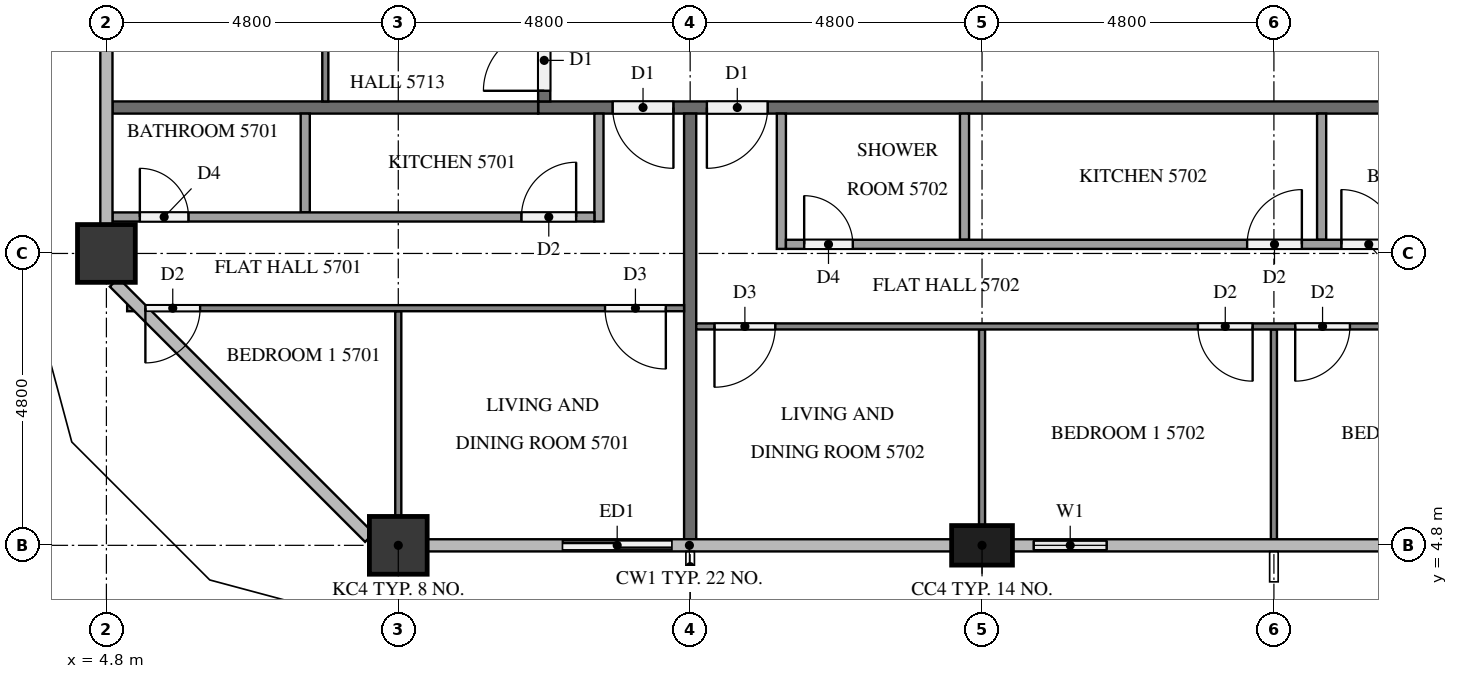
"""IFC4 building model, lengths in metres.
Left out: names, types, materials, properties, quantities, classifications, styles, units other than length and angle.
Written with IfcOpenShell. Run it as: python <this file> out.ifc"""

import sys

from ifc_helpers import new_model, si_unit, direction, frame, frame_2d, origin, origin_2d, place, context, subcontext, project, spatial, rectangle, extrude, element, fill, save


model = new_model("IFC4")
c1 = context("Model", 3, precision=1e-05, world=origin(), true_north=direction((0.0, 1.0)))
c2 = subcontext(c1, "Body", "Model", "MODEL_VIEW")
j1 = project(units=[si_unit("LENGTHUNIT", "METRE"), si_unit("PLANEANGLEUNIT", "RADIAN")], contexts=[c1])
p1 = place(None, origin())
s1 = spatial("IfcSite", under=j1, at=p1, CompositionType="ELEMENT")
p2 = place(p1, origin())
s2 = spatial("IfcBuilding", under=s1, at=p2, CompositionType="ELEMENT")
p3 = place(p2, frame((0.0, 0.0, 219.3)))
s3 = spatial("IfcBuildingStorey", under=s2, at=p3, CompositionType="ELEMENT", Elevation=219.3)
p4 = place(p3, frame((9.6, 4.8, 0.0), z_axis=(0.0, 0.0, 1.0), x_axis=(1.0, 0.0, 0.0)))
e1 = element("IfcColumn", 1, at=p4, inside=s3, PredefinedType="COLUMN", context=c2, shape_type="SweptSolid", body=[
    extrude(rectangle(XDim=0.95, YDim=0.95, at=origin_2d()), origin(), (0.0, 0.0, 1.0), 3.2),
])
p5 = place(p3, frame((19.2, 4.8, 0.0), z_axis=(0.0, 0.0, 1.0), x_axis=(1.0, 0.0, 0.0)))
e2 = element("IfcColumn", 2, at=p5, inside=s3, PredefinedType="COLUMN", context=c2, shape_type="SweptSolid", body=[
    extrude(rectangle(XDim=1.0, YDim=0.65, at=origin_2d()), origin(), (0.0, 0.0, 1.0), 3.2),
])
p6 = place(p3, frame((4.8, 9.6, 0.0), z_axis=(0.0, 0.0, 1.0), x_axis=(1.0, 0.0, 0.0)))
e3 = element("IfcColumn", 3, at=p6, inside=s3, PredefinedType="COLUMN", context=c2, shape_type="SweptSolid", body=[
    extrude(rectangle(XDim=0.95, YDim=0.95, at=origin_2d()), origin(), (0.0, 0.0, 1.0), 3.2),
])
p7 = place(p3, frame((12.0, 4.8, 0.0), z_axis=(0.0, 0.0, 1.0), x_axis=(1.0, 0.0, 0.0)))
e4 = element("IfcWall", 4, at=p7, inside=s3, PredefinedType="SOLIDWALL", context=c2, shape_type="SweptSolid", body=[
    extrude(rectangle(XDim=2.4, YDim=0.15, at=frame_2d((1.2, 0.0))), origin(), (0.0, 0.0, 1.0), 3.2),
])
p8 = place(p7, frame((0.3, 0.0, 0.0)))
e5 = element("IfcOpeningElement", 5, at=p8, cuts=e4, PredefinedType="OPENING", context=c2, shape_type="SweptSolid", body=[
    extrude(rectangle(XDim=1.8, YDim=2.4, at=frame_2d((0.9, 1.2))), frame((0.0, 0.085, 0.0), z_axis=(0.0, -1.0, 0.0), x_axis=(1.0, 0.0, 0.0)), (0.0, 0.0, 1.0), 0.17),
])
p9 = place(p3, frame((19.7, 4.8, 0.0), z_axis=(0.0, 0.0, 1.0), x_axis=(1.0, 0.0, 0.0)))
e6 = element("IfcWall", 6, at=p9, inside=s3, PredefinedType="SOLIDWALL", context=c2, shape_type="SweptSolid", body=[
    extrude(rectangle(XDim=1.9, YDim=0.15, at=frame_2d((0.95, 0.0))), origin(), (0.0, 0.0, 1.0), 3.2),
])
p10 = place(p9, frame((0.35, 0.0, 0.9)))
e7 = element("IfcOpeningElement", 7, at=p10, cuts=e6, PredefinedType="OPENING", context=c2, shape_type="SweptSolid", body=[
    extrude(rectangle(XDim=1.2, YDim=1.4, at=frame_2d((0.6, 0.7))), frame((0.0, 0.085, 0.0), z_axis=(0.0, -1.0, 0.0), x_axis=(1.0, 0.0, 0.0)), (0.0, 0.0, 1.0), 0.17),
])
p11 = place(p3, frame((50.5, 12.0, 0.0), z_axis=(0.0, 0.0, 1.0), x_axis=(-1.0, 0.0, 0.0)))
e8 = element("IfcWall", 8, at=p11, inside=s3, PredefinedType="PARTITIONING", context=c2, shape_type="SweptSolid", body=[
    extrude(rectangle(XDim=38.6, YDim=0.2, at=frame_2d((19.3, 0.0))), origin(), (0.0, 0.0, 1.0), 3.2),
])
p12 = place(p11, frame((36.375, 0.0, 0.0)))
e9 = element("IfcOpeningElement", 9, at=p12, cuts=e8, PredefinedType="OPENING", context=c2, shape_type="SweptSolid", body=[
    extrude(rectangle(XDim=1.0, YDim=2.1, at=frame_2d((0.5, 1.05))), frame((0.0, 0.11, 0.0), z_axis=(0.0, -1.0, 0.0), x_axis=(1.0, 0.0, 0.0)), (0.0, 0.0, 1.0), 0.22),
])
p13 = place(p11, frame((34.825, 0.0, 0.0)))
e10 = element("IfcOpeningElement", 10, at=p13, cuts=e8, PredefinedType="OPENING", context=c2, shape_type="SweptSolid", body=[
    extrude(rectangle(XDim=1.0, YDim=2.1, at=frame_2d((0.5, 1.05))), frame((0.0, 0.11, 0.0), z_axis=(0.0, -1.0, 0.0), x_axis=(1.0, 0.0, 0.0)), (0.0, 0.0, 1.0), 0.22),
])
p14 = place(p11, frame((20.375, 0.0, 0.0)))
e11 = element("IfcOpeningElement", 11, at=p14, cuts=e8, PredefinedType="OPENING", context=c2, shape_type="SweptSolid", body=[
    extrude(rectangle(XDim=1.1, YDim=2.1, at=frame_2d((0.55, 1.05))), frame((0.0, 0.11, 0.0), z_axis=(0.0, -1.0, 0.0), x_axis=(1.0, 0.0, 0.0)), (0.0, 0.0, 1.0), 0.22),
])
p15 = place(p11, frame((1.225, 0.0, 0.0)))
e12 = element("IfcOpeningElement", 12, at=p15, cuts=e8, PredefinedType="OPENING", context=c2, shape_type="SweptSolid", body=[
    extrude(rectangle(XDim=1.0, YDim=2.1, at=frame_2d((0.5, 1.05))), frame((0.0, 0.11, 0.0), z_axis=(0.0, -1.0, 0.0), x_axis=(1.0, 0.0, 0.0)), (0.0, 0.0, 1.0), 0.22),
])
p16 = place(p3, frame((12.0, 12.1, 0.0), z_axis=(0.0, 0.0, 1.0), x_axis=(0.0, 1.0, 0.0)))
e13 = element("IfcWall", 13, at=p16, inside=s3, PredefinedType="PARTITIONING", context=c2, shape_type="SweptSolid", body=[
    extrude(rectangle(XDim=28.6, YDim=0.2, at=frame_2d((14.3, 0.0))), origin(), (0.0, 0.0, 1.0), 3.2),
])
p17 = place(p16, frame((9.725, 0.0, 0.0)))
e14 = element("IfcOpeningElement", 14, at=p17, cuts=e13, PredefinedType="OPENING", context=c2, shape_type="SweptSolid", body=[
    extrude(rectangle(XDim=1.1, YDim=2.1, at=frame_2d((0.55, 1.05))), frame((0.0, 0.11, 0.0), z_axis=(0.0, -1.0, 0.0), x_axis=(1.0, 0.0, 0.0)), (0.0, 0.0, 1.0), 0.22),
])
p18 = place(p16, frame((0.175, 0.0, 0.0)))
e15 = element("IfcOpeningElement", 15, at=p18, cuts=e13, PredefinedType="OPENING", context=c2, shape_type="SweptSolid", body=[
    extrude(rectangle(XDim=1.0, YDim=2.1, at=frame_2d((0.5, 1.05))), frame((0.0, 0.11, 0.0), z_axis=(0.0, -1.0, 0.0), x_axis=(1.0, 0.0, 0.0)), (0.0, 0.0, 1.0), 0.22),
])
for number, where, z_axis, x_axis in (
    (16, (14.4, 11.9, 0.0), (0.0, 0.0, 1.0), (0.0, -1.0, 0.0)),
    (17, (4.9, 12.0, 0.0), (0.0, 0.0, 1.0), (1.0, 0.0, 0.0)),
):
    element("IfcWall", number, at=place(p3, frame(where, z_axis=z_axis, x_axis=x_axis)), inside=s3, PredefinedType="PARTITIONING", context=c2, shape_type="SweptSolid", body=[
        extrude(rectangle(XDim=7.0, YDim=0.2, at=frame_2d((3.5, 0.0))), origin(), (0.0, 0.0, 1.0), 3.2),
    ])
p19 = place(p3, frame((9.6, 8.65, 0.0), z_axis=(0.0, 0.0, 1.0), x_axis=(0.0, -1.0, 0.0)))
e18 = element("IfcWall", 18, at=p19, inside=s3, PredefinedType="PARTITIONING", context=c2, shape_type="SweptSolid", body=[
    extrude(rectangle(XDim=3.375, YDim=0.1, at=frame_2d((1.688, 0.0))), origin(), (0.0, 0.0, 1.0), 3.2),
])
p20 = place(p3, frame((14.3, 8.7, 0.0), z_axis=(0.0, 0.0, 1.0), x_axis=(-1.0, 0.0, 0.0)))
e19 = element("IfcWall", 19, at=p20, inside=s3, PredefinedType="PARTITIONING", context=c2, shape_type="SweptSolid", body=[
    extrude(rectangle(XDim=9.159, YDim=0.1, at=frame_2d((4.58, 0.0))), origin(), (0.0, 0.0, 1.0), 3.2),
])
p21 = place(p20, frame((0.3, 0.0, 0.0)))
e20 = element("IfcOpeningElement", 20, at=p21, cuts=e19, PredefinedType="OPENING", context=c2, shape_type="SweptSolid", body=[
    extrude(rectangle(XDim=1.0, YDim=2.1, at=frame_2d((0.5, 1.05))), frame((0.0, 0.06, 0.0), z_axis=(0.0, -1.0, 0.0), x_axis=(1.0, 0.0, 0.0)), (0.0, 0.0, 1.0), 0.12),
])
p22 = place(p20, frame((7.959, 0.0, 0.0)))
e21 = element("IfcOpeningElement", 21, at=p22, cuts=e19, PredefinedType="OPENING", context=c2, shape_type="SweptSolid", body=[
    extrude(rectangle(XDim=0.9, YDim=2.1, at=frame_2d((0.45, 1.05))), frame((0.0, 0.06, 0.0), z_axis=(0.0, -1.0, 0.0), x_axis=(1.0, 0.0, 0.0)), (0.0, 0.0, 1.0), 0.12),
])
p23 = place(p3, frame((8.07, 11.9, 0.0), z_axis=(0.0, 0.0, 1.0), x_axis=(0.0, -1.0, 0.0)))
e22 = element("IfcWall", 22, at=p23, inside=s3, PredefinedType="PARTITIONING", context=c2, shape_type="SweptSolid", body=[
    extrude(rectangle(XDim=1.625, YDim=0.15, at=frame_2d((0.812, 0.0))), origin(), (0.0, 0.0, 1.0), 3.2),
])
p24 = place(p3, frame((12.9, 11.9, 0.0), z_axis=(0.0, 0.0, 1.0), x_axis=(0.0, -1.0, 0.0)))
e23 = element("IfcWall", 23, at=p24, inside=s3, PredefinedType="PARTITIONING", context=c2, shape_type="SweptSolid", body=[
    extrude(rectangle(XDim=1.775, YDim=0.15, at=frame_2d((0.887, 0.0))), origin(), (0.0, 0.0, 1.0), 3.2),
])
p25 = place(p3, frame((4.9, 10.2, 0.0), z_axis=(0.0, 0.0, 1.0), x_axis=(1.0, 0.0, 0.0)))
e24 = element("IfcWall", 24, at=p25, inside=s3, PredefinedType="PARTITIONING", context=c2, shape_type="SweptSolid", body=[
    extrude(rectangle(XDim=7.925, YDim=0.15, at=frame_2d((3.962, 0.0))), origin(), (0.0, 0.0, 1.0), 3.2),
])
p26 = place(p25, frame((6.725, 0.0, 0.0)))
e25 = element("IfcOpeningElement", 25, at=p26, cuts=e24, PredefinedType="OPENING", context=c2, shape_type="SweptSolid", body=[
    extrude(rectangle(XDim=0.9, YDim=2.1, at=frame_2d((0.45, 1.05))), frame((0.0, 0.085, 0.0), z_axis=(0.0, -1.0, 0.0), x_axis=(1.0, 0.0, 0.0)), (0.0, 0.0, 1.0), 0.17),
])
p27 = place(p25, frame((0.45, 0.0, 0.0)))
e26 = element("IfcOpeningElement", 26, at=p27, cuts=e24, PredefinedType="OPENING", context=c2, shape_type="SweptSolid", body=[
    extrude(rectangle(XDim=0.8, YDim=2.1, at=frame_2d((0.4, 1.05))), frame((0.0, 0.085, 0.0), z_axis=(0.0, -1.0, 0.0), x_axis=(1.0, 0.0, 0.0)), (0.0, 0.0, 1.0), 0.17),
])
p28 = place(p3, frame((19.2, 8.35, 0.0), z_axis=(0.0, 0.0, 1.0), x_axis=(0.0, -1.0, 0.0)))
e27 = element("IfcWall", 27, at=p28, inside=s3, PredefinedType="PARTITIONING", context=c2, shape_type="SweptSolid", body=[
    extrude(rectangle(XDim=3.225, YDim=0.1, at=frame_2d((1.613, 0.0))), origin(), (0.0, 0.0, 1.0), 3.2),
])
p29 = place(p3, frame((24.0, 8.35, 0.0), z_axis=(0.0, 0.0, 1.0), x_axis=(0.0, -1.0, 0.0)))
e28 = element("IfcWall", 28, at=p29, inside=s3, PredefinedType="PARTITIONING", context=c2, shape_type="SweptSolid", body=[
    extrude(rectangle(XDim=3.45, YDim=0.1, at=frame_2d((1.725, 0.0))), origin(), (0.0, 0.0, 1.0), 3.2),
])
p30 = place(p3, frame((28.7, 8.4, 0.0), z_axis=(0.0, 0.0, 1.0), x_axis=(-1.0, 0.0, 0.0)))
e29 = element("IfcWall", 29, at=p30, inside=s3, PredefinedType="PARTITIONING", context=c2, shape_type="SweptSolid", body=[
    extrude(rectangle(XDim=14.2, YDim=0.1, at=frame_2d((7.1, 0.0))), origin(), (0.0, 0.0, 1.0), 3.2),
])
p31 = place(p30, frame((12.9, 0.0, 0.0)))
e30 = element("IfcOpeningElement", 30, at=p31, cuts=e29, PredefinedType="OPENING", context=c2, shape_type="SweptSolid", body=[
    extrude(rectangle(XDim=1.0, YDim=2.1, at=frame_2d((0.5, 1.05))), frame((0.0, 0.06, 0.0), z_axis=(0.0, -1.0, 0.0), x_axis=(1.0, 0.0, 0.0)), (0.0, 0.0, 1.0), 0.12),
])
p32 = place(p30, frame((5.05, 0.0, 0.0)))
e31 = element("IfcOpeningElement", 31, at=p32, cuts=e29, PredefinedType="OPENING", context=c2, shape_type="SweptSolid", body=[
    extrude(rectangle(XDim=0.9, YDim=2.1, at=frame_2d((0.45, 1.05))), frame((0.0, 0.06, 0.0), z_axis=(0.0, -1.0, 0.0), x_axis=(1.0, 0.0, 0.0)), (0.0, 0.0, 1.0), 0.12),
])
p33 = place(p30, frame((3.45, 0.0, 0.0)))
e32 = element("IfcOpeningElement", 32, at=p33, cuts=e29, PredefinedType="OPENING", context=c2, shape_type="SweptSolid", body=[
    extrude(rectangle(XDim=0.9, YDim=2.1, at=frame_2d((0.45, 1.05))), frame((0.0, 0.06, 0.0), z_axis=(0.0, -1.0, 0.0), x_axis=(1.0, 0.0, 0.0)), (0.0, 0.0, 1.0), 0.12),
])
for number, where, z_axis, x_axis in (
    (33, (18.912, 11.9, 0.0), (0.0, 0.0, 1.0), (0.0, -1.0, 0.0)),
    (34, (24.785, 11.9, 0.0), (0.0, 0.0, 1.0), (0.0, -1.0, 0.0)),
):
    element("IfcWall", number, at=place(p3, frame(where, z_axis=z_axis, x_axis=x_axis)), inside=s3, PredefinedType="PARTITIONING", context=c2, shape_type="SweptSolid", body=[
        extrude(rectangle(XDim=2.075, YDim=0.15, at=frame_2d((1.038, 0.0))), origin(), (0.0, 0.0, 1.0), 3.2),
    ])
p34 = place(p3, frame((15.9, 11.9, 0.0), z_axis=(0.0, 0.0, 1.0), x_axis=(0.0, -1.0, 0.0)))
e35 = element("IfcWall", 35, at=p34, inside=s3, PredefinedType="PARTITIONING", context=c2, shape_type="SweptSolid", body=[
    extrude(rectangle(XDim=2.225, YDim=0.15, at=frame_2d((1.112, 0.0))), origin(), (0.0, 0.0, 1.0), 3.2),
])
p35 = place(p3, frame((15.975, 9.75, 0.0), z_axis=(0.0, 0.0, 1.0), x_axis=(1.0, 0.0, 0.0)))
e36 = element("IfcWall", 36, at=p35, inside=s3, PredefinedType="PARTITIONING", context=c2, shape_type="SweptSolid", body=[
    extrude(rectangle(XDim=12.725, YDim=0.15, at=frame_2d((6.362, 0.0))), origin(), (0.0, 0.0, 1.0), 3.2),
])
p36 = place(p35, frame((0.3, 0.0, 0.0)))
e37 = element("IfcOpeningElement", 37, at=p36, cuts=e36, PredefinedType="OPENING", context=c2, shape_type="SweptSolid", body=[
    extrude(rectangle(XDim=0.8, YDim=2.1, at=frame_2d((0.4, 1.05))), frame((0.0, 0.085, 0.0), z_axis=(0.0, -1.0, 0.0), x_axis=(1.0, 0.0, 0.0)), (0.0, 0.0, 1.0), 0.17),
])
p37 = place(p35, frame((7.585, 0.0, 0.0)))
e38 = element("IfcOpeningElement", 38, at=p37, cuts=e36, PredefinedType="OPENING", context=c2, shape_type="SweptSolid", body=[
    extrude(rectangle(XDim=0.9, YDim=2.1, at=frame_2d((0.45, 1.05))), frame((0.0, 0.085, 0.0), z_axis=(0.0, -1.0, 0.0), x_axis=(1.0, 0.0, 0.0)), (0.0, 0.0, 1.0), 0.17),
])
p38 = place(p35, frame((9.135, 0.0, 0.0)))
e39 = element("IfcOpeningElement", 39, at=p38, cuts=e36, PredefinedType="OPENING", context=c2, shape_type="SweptSolid", body=[
    extrude(rectangle(XDim=0.9, YDim=2.1, at=frame_2d((0.45, 1.05))), frame((0.0, 0.085, 0.0), z_axis=(0.0, -1.0, 0.0), x_axis=(1.0, 0.0, 0.0)), (0.0, 0.0, 1.0), 0.17),
])
p39 = place(p3, frame((8.4, 12.1, 0.0), z_axis=(0.0, 0.0, 1.0), x_axis=(0.0, 1.0, 0.0)))
e40 = element("IfcWall", 40, at=p39, inside=s3, PredefinedType="PARTITIONING", context=c2, shape_type="SweptSolid", body=[
    extrude(rectangle(XDim=9.4, YDim=0.1, at=frame_2d((4.7, 0.0))), origin(), (0.0, 0.0, 1.0), 3.2),
])
p40 = place(p39, frame((3.35, 0.0, 0.0)))
e41 = element("IfcOpeningElement", 41, at=p40, cuts=e40, PredefinedType="OPENING", context=c2, shape_type="SweptSolid", body=[
    extrude(rectangle(XDim=1.0, YDim=2.1, at=frame_2d((0.5, 1.05))), frame((0.0, 0.06, 0.0), z_axis=(0.0, -1.0, 0.0), x_axis=(1.0, 0.0, 0.0)), (0.0, 0.0, 1.0), 0.12),
])
p41 = place(p39, frame((5.05, 0.0, 0.0)))
e42 = element("IfcOpeningElement", 42, at=p41, cuts=e40, PredefinedType="OPENING", context=c2, shape_type="SweptSolid", body=[
    extrude(rectangle(XDim=0.9, YDim=2.1, at=frame_2d((0.45, 1.05))), frame((0.0, 0.06, 0.0), z_axis=(0.0, -1.0, 0.0), x_axis=(1.0, 0.0, 0.0)), (0.0, 0.0, 1.0), 0.12),
])
p42 = place(p8, origin())
e43 = element("IfcDoor", 43, at=p42, inside=s3, OperationType="SLIDING_TO_LEFT", PredefinedType="DOOR", context=c2, shape_type="SweptSolid", body=[
    extrude(rectangle(XDim=1.8, YDim=2.4, at=frame_2d((0.9, 1.2))), frame((0.0, 0.025, 0.0), z_axis=(0.0, -1.0, 0.0), x_axis=(1.0, 0.0, 0.0)), (0.0, 0.0, 1.0), 0.05),
])
fill(e5, e43)
p43 = place(p10, origin())
e44 = element("IfcWindow", 44, at=p43, inside=s3, PartitioningType="SINGLE_PANEL", PredefinedType="WINDOW", context=c2, shape_type="SweptSolid", body=[
    extrude(rectangle(XDim=1.2, YDim=1.4, at=frame_2d((0.6, 0.7))), frame((0.0, 0.03, 0.0), z_axis=(0.0, -1.0, 0.0), x_axis=(1.0, 0.0, 0.0)), (0.0, 0.0, 1.0), 0.06),
])
fill(e7, e44)
p44 = place(p12, origin())
e45 = element("IfcDoor", 45, at=p44, inside=s3, OperationType="SINGLE_SWING_LEFT", PredefinedType="DOOR", context=c2, shape_type="SweptSolid", body=[
    extrude(rectangle(XDim=1.0, YDim=2.1, at=frame_2d((0.5, 1.05))), frame((0.0, 0.025, 0.0), z_axis=(0.0, -1.0, 0.0), x_axis=(1.0, 0.0, 0.0)), (0.0, 0.0, 1.0), 0.05),
])
fill(e9, e45)
p45 = place(p13, origin())
e46 = element("IfcDoor", 46, at=p45, inside=s3, OperationType="SINGLE_SWING_RIGHT", PredefinedType="DOOR", context=c2, shape_type="SweptSolid", body=[
    extrude(rectangle(XDim=1.0, YDim=2.1, at=frame_2d((0.5, 1.05))), frame((0.0, 0.025, 0.0), z_axis=(0.0, -1.0, 0.0), x_axis=(1.0, 0.0, 0.0)), (0.0, 0.0, 1.0), 0.05),
])
fill(e10, e46)
p46 = place(p18, origin())
e47 = element("IfcDoor", 47, at=p46, inside=s3, OperationType="SINGLE_SWING_LEFT", PredefinedType="DOOR", context=c2, shape_type="SweptSolid", body=[
    extrude(rectangle(XDim=1.0, YDim=2.1, at=frame_2d((0.5, 1.05))), frame((0.0, 0.025, 0.0), z_axis=(0.0, -1.0, 0.0), x_axis=(1.0, 0.0, 0.0)), (0.0, 0.0, 1.0), 0.05),
])
fill(e15, e47)
p47 = place(p21, origin())
e48 = element("IfcDoor", 48, at=p47, inside=s3, OperationType="SINGLE_SWING_LEFT", PredefinedType="DOOR", context=c2, shape_type="SweptSolid", body=[
    extrude(rectangle(XDim=1.0, YDim=2.1, at=frame_2d((0.5, 1.05))), frame((0.0, 0.025, 0.0), z_axis=(0.0, -1.0, 0.0), x_axis=(1.0, 0.0, 0.0)), (0.0, 0.0, 1.0), 0.05),
])
fill(e20, e48)
p48 = place(p22, origin())
e49 = element("IfcDoor", 49, at=p48, inside=s3, OperationType="SINGLE_SWING_RIGHT", PredefinedType="DOOR", context=c2, shape_type="SweptSolid", body=[
    extrude(rectangle(XDim=0.9, YDim=2.1, at=frame_2d((0.45, 1.05))), frame((0.0, 0.025, 0.0), z_axis=(0.0, -1.0, 0.0), x_axis=(1.0, 0.0, 0.0)), (0.0, 0.0, 1.0), 0.05),
])
fill(e21, e49)
p49 = place(p26, origin())
e50 = element("IfcDoor", 50, at=p49, inside=s3, OperationType="SINGLE_SWING_RIGHT", PredefinedType="DOOR", context=c2, shape_type="SweptSolid", body=[
    extrude(rectangle(XDim=0.9, YDim=2.1, at=frame_2d((0.45, 1.05))), frame((0.0, 0.025, 0.0), z_axis=(0.0, -1.0, 0.0), x_axis=(1.0, 0.0, 0.0)), (0.0, 0.0, 1.0), 0.05),
])
fill(e25, e50)
p50 = place(p27, origin())
e51 = element("IfcDoor", 51, at=p50, inside=s3, OperationType="SINGLE_SWING_LEFT", PredefinedType="DOOR", context=c2, shape_type="SweptSolid", body=[
    extrude(rectangle(XDim=0.8, YDim=2.1, at=frame_2d((0.4, 1.05))), frame((0.0, 0.025, 0.0), z_axis=(0.0, -1.0, 0.0), x_axis=(1.0, 0.0, 0.0)), (0.0, 0.0, 1.0), 0.05),
])
fill(e26, e51)
p51 = place(p31, origin())
e52 = element("IfcDoor", 52, at=p51, inside=s3, OperationType="SINGLE_SWING_RIGHT", PredefinedType="DOOR", context=c2, shape_type="SweptSolid", body=[
    extrude(rectangle(XDim=1.0, YDim=2.1, at=frame_2d((0.5, 1.05))), frame((0.0, 0.025, 0.0), z_axis=(0.0, -1.0, 0.0), x_axis=(1.0, 0.0, 0.0)), (0.0, 0.0, 1.0), 0.05),
])
fill(e30, e52)
p52 = place(p32, origin())
e53 = element("IfcDoor", 53, at=p52, inside=s3, OperationType="SINGLE_SWING_LEFT", PredefinedType="DOOR", context=c2, shape_type="SweptSolid", body=[
    extrude(rectangle(XDim=0.9, YDim=2.1, at=frame_2d((0.45, 1.05))), frame((0.0, 0.025, 0.0), z_axis=(0.0, -1.0, 0.0), x_axis=(1.0, 0.0, 0.0)), (0.0, 0.0, 1.0), 0.05),
])
fill(e31, e53)
p53 = place(p33, origin())
e54 = element("IfcDoor", 54, at=p53, inside=s3, OperationType="SINGLE_SWING_RIGHT", PredefinedType="DOOR", context=c2, shape_type="SweptSolid", body=[
    extrude(rectangle(XDim=0.9, YDim=2.1, at=frame_2d((0.45, 1.05))), frame((0.0, 0.025, 0.0), z_axis=(0.0, -1.0, 0.0), x_axis=(1.0, 0.0, 0.0)), (0.0, 0.0, 1.0), 0.05),
])
fill(e32, e54)
p54 = place(p36, origin())
e55 = element("IfcDoor", 55, at=p54, inside=s3, OperationType="SINGLE_SWING_LEFT", PredefinedType="DOOR", context=c2, shape_type="SweptSolid", body=[
    extrude(rectangle(XDim=0.8, YDim=2.1, at=frame_2d((0.4, 1.05))), frame((0.0, 0.025, 0.0), z_axis=(0.0, -1.0, 0.0), x_axis=(1.0, 0.0, 0.0)), (0.0, 0.0, 1.0), 0.05),
])
fill(e37, e55)
p55 = place(p37, origin())
e56 = element("IfcDoor", 56, at=p55, inside=s3, OperationType="SINGLE_SWING_RIGHT", PredefinedType="DOOR", context=c2, shape_type="SweptSolid", body=[
    extrude(rectangle(XDim=0.9, YDim=2.1, at=frame_2d((0.45, 1.05))), frame((0.0, 0.025, 0.0), z_axis=(0.0, -1.0, 0.0), x_axis=(1.0, 0.0, 0.0)), (0.0, 0.0, 1.0), 0.05),
])
fill(e38, e56)
p56 = place(p38, origin())
e57 = element("IfcDoor", 57, at=p56, inside=s3, OperationType="SINGLE_SWING_LEFT", PredefinedType="DOOR", context=c2, shape_type="SweptSolid", body=[
    extrude(rectangle(XDim=0.9, YDim=2.1, at=frame_2d((0.45, 1.05))), frame((0.0, 0.025, 0.0), z_axis=(0.0, -1.0, 0.0), x_axis=(1.0, 0.0, 0.0)), (0.0, 0.0, 1.0), 0.05),
])
fill(e39, e57)
save(model, sys.argv[1])
